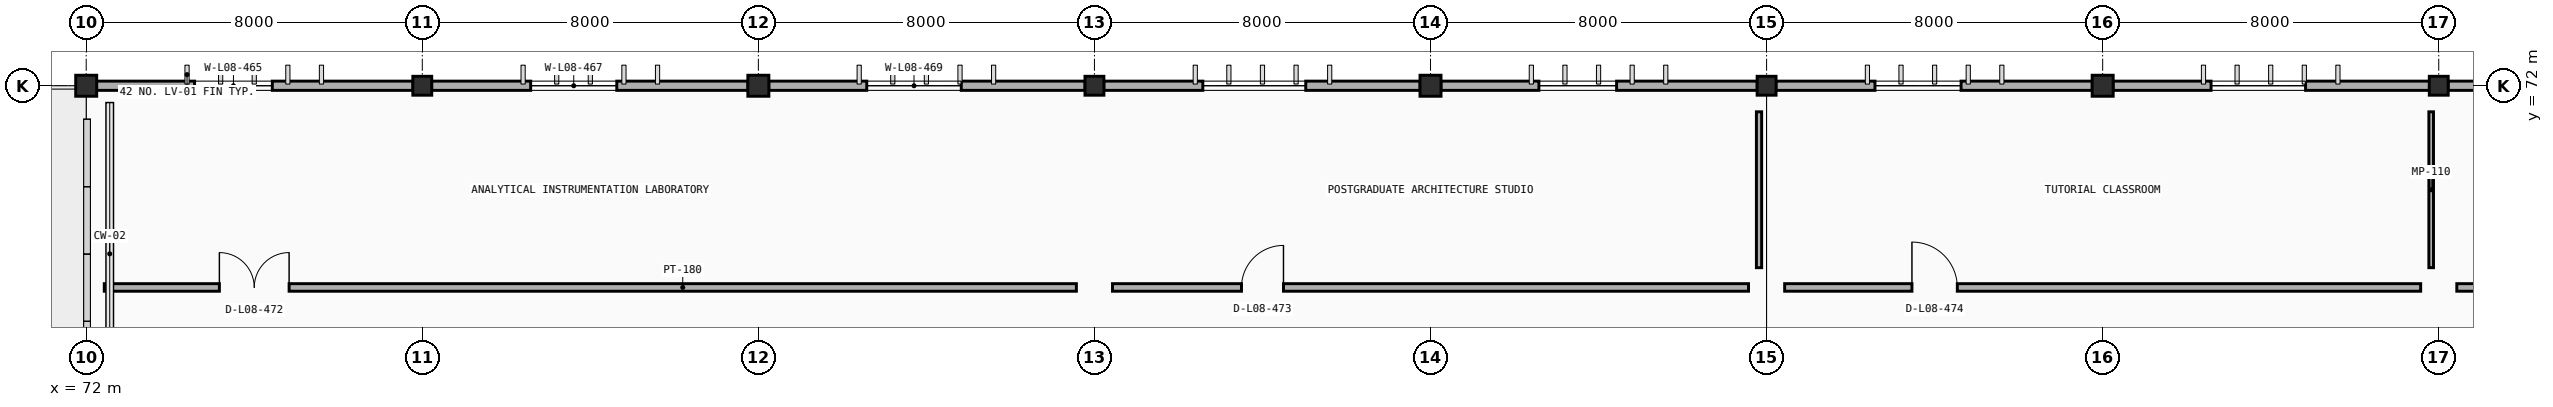
"""IFC4 building model, lengths in metres.
Left out: names, types, materials, properties, quantities, classifications, styles, units other than length and angle.
Written with IfcOpenShell. Run it as: python <this file> out.ifc"""

import sys

from ifc_helpers import new_model, si_unit, direction, frame, frame_2d, origin, origin_2d, place, context, subcontext, project, spatial, rectangle, extrude, element, fill, save


model = new_model("IFC4")
c1 = context("Model", 3, precision=1e-05, world=origin(), true_north=direction((0.0, 1.0)))
c2 = subcontext(c1, "Body", "Model", "MODEL_VIEW")
j1 = project(units=[si_unit("LENGTHUNIT", "METRE"), si_unit("PLANEANGLEUNIT", "RADIAN")], contexts=[c1])
p1 = place(None, origin())
s1 = spatial("IfcSite", under=j1, at=p1, CompositionType="ELEMENT")
p2 = place(p1, origin())
s2 = spatial("IfcBuilding", under=s1, at=p2, CompositionType="ELEMENT")
p3 = place(p2, frame((0.0, 0.0, 30.6)))
s3 = spatial("IfcBuildingStorey", under=s2, at=p3, CompositionType="ELEMENT", Elevation=30.6)
p4 = place(p3, frame((72.0, 72.0, 0.0), z_axis=(0.0, 0.0, 1.0), x_axis=(1.0, 0.0, 0.0)))
e1 = element("IfcColumn", 1, at=p4, inside=s3, PredefinedType="COLUMN", context=c2, shape_type="SweptSolid", body=[
    extrude(rectangle(XDim=0.5, YDim=0.5, at=origin_2d()), origin(), (0.0, 0.0, 1.0), 4.2),
])
p5 = place(p3, frame((80.0, 72.0, 0.0), z_axis=(0.0, 0.0, 1.0), x_axis=(1.0, 0.0, 0.0)))
e2 = element("IfcColumn", 2, at=p5, inside=s3, PredefinedType="COLUMN", context=c2, shape_type="SweptSolid", body=[
    extrude(rectangle(XDim=0.45, YDim=0.45, at=origin_2d()), origin(), (0.0, 0.0, 1.0), 4.2),
])
p6 = place(p3, frame((88.0, 72.0, 0.0), z_axis=(0.0, 0.0, 1.0), x_axis=(1.0, 0.0, 0.0)))
e3 = element("IfcColumn", 3, at=p6, inside=s3, PredefinedType="COLUMN", context=c2, shape_type="SweptSolid", body=[
    extrude(rectangle(XDim=0.5, YDim=0.5, at=origin_2d()), origin(), (0.0, 0.0, 1.0), 4.2),
])
p7 = place(p3, frame((96.0, 72.0, 0.0), z_axis=(0.0, 0.0, 1.0), x_axis=(1.0, 0.0, 0.0)))
e4 = element("IfcColumn", 4, at=p7, inside=s3, PredefinedType="COLUMN", context=c2, shape_type="SweptSolid", body=[
    extrude(rectangle(XDim=0.45, YDim=0.45, at=origin_2d()), origin(), (0.0, 0.0, 1.0), 4.2),
])
p8 = place(p3, frame((104.0, 72.0, 0.0), z_axis=(0.0, 0.0, 1.0), x_axis=(1.0, 0.0, 0.0)))
e5 = element("IfcColumn", 5, at=p8, inside=s3, PredefinedType="COLUMN", context=c2, shape_type="SweptSolid", body=[
    extrude(rectangle(XDim=0.5, YDim=0.5, at=origin_2d()), origin(), (0.0, 0.0, 1.0), 4.2),
])
p9 = place(p3, frame((112.0, 72.0, 0.0), z_axis=(0.0, 0.0, 1.0), x_axis=(1.0, 0.0, 0.0)))
e6 = element("IfcColumn", 6, at=p9, inside=s3, PredefinedType="COLUMN", context=c2, shape_type="SweptSolid", body=[
    extrude(rectangle(XDim=0.45, YDim=0.45, at=origin_2d()), origin(), (0.0, 0.0, 1.0), 4.2),
])
p10 = place(p3, frame((120.0, 72.0, 0.0), z_axis=(0.0, 0.0, 1.0), x_axis=(1.0, 0.0, 0.0)))
e7 = element("IfcColumn", 7, at=p10, inside=s3, PredefinedType="COLUMN", context=c2, shape_type="SweptSolid", body=[
    extrude(rectangle(XDim=0.5, YDim=0.5, at=origin_2d()), origin(), (0.0, 0.0, 1.0), 4.2),
])
p11 = place(p3, frame((128.0, 72.0, 0.0), z_axis=(0.0, 0.0, 1.0), x_axis=(1.0, 0.0, 0.0)))
e8 = element("IfcColumn", 8, at=p11, inside=s3, PredefinedType="COLUMN", context=c2, shape_type="SweptSolid", body=[
    extrude(rectangle(XDim=0.45, YDim=0.45, at=origin_2d()), origin(), (0.0, 0.0, 1.0), 4.2),
])
p12 = place(p3, frame((72.247, 72.0, 0.0), z_axis=(0.0, 0.0, 1.0), x_axis=(1.0, 0.0, 0.0)))
e9 = element("IfcWall", 9, at=p12, inside=s3, PredefinedType="STANDARD", context=c2, shape_type="SweptSolid", body=[
    extrude(rectangle(XDim=7.531, YDim=0.22, at=frame_2d((3.766, 0.0))), origin(), (0.0, 0.0, 1.0), 3.335),
])
p13 = place(p12, frame((2.333, 0.0, 0.9)))
e10 = element("IfcOpeningElement", 10, at=p13, cuts=e9, PredefinedType="OPENING", context=c2, shape_type="SweptSolid", body=[
    extrude(rectangle(XDim=1.85, YDim=1.25, at=frame_2d((0.925, 0.625))), frame((0.0, 0.12, 0.0), z_axis=(0.0, -1.0, 0.0), x_axis=(1.0, 0.0, 0.0)), (0.0, 0.0, 1.0), 0.24),
])
p14 = place(p3, frame((80.222, 72.0, 0.0), z_axis=(0.0, 0.0, 1.0), x_axis=(1.0, 0.0, 0.0)))
e11 = element("IfcWall", 11, at=p14, inside=s3, PredefinedType="STANDARD", context=c2, shape_type="SweptSolid", body=[
    extrude(rectangle(XDim=7.531, YDim=0.22, at=frame_2d((3.766, 0.0))), origin(), (0.0, 0.0, 1.0), 3.335),
])
p15 = place(p14, frame((2.358, 0.0, 0.9)))
e12 = element("IfcOpeningElement", 12, at=p15, cuts=e11, PredefinedType="OPENING", context=c2, shape_type="SweptSolid", body=[
    extrude(rectangle(XDim=2.05, YDim=1.25, at=frame_2d((1.025, 0.625))), frame((0.0, 0.12, 0.0), z_axis=(0.0, -1.0, 0.0), x_axis=(1.0, 0.0, 0.0)), (0.0, 0.0, 1.0), 0.24),
])
p16 = place(p3, frame((88.247, 72.0, 0.0), z_axis=(0.0, 0.0, 1.0), x_axis=(1.0, 0.0, 0.0)))
e13 = element("IfcWall", 13, at=p16, inside=s3, PredefinedType="STANDARD", context=c2, shape_type="SweptSolid", body=[
    extrude(rectangle(XDim=7.531, YDim=0.22, at=frame_2d((3.766, 0.0))), origin(), (0.0, 0.0, 1.0), 3.335),
])
p17 = place(p16, frame((2.333, 0.0, 0.9)))
e14 = element("IfcOpeningElement", 14, at=p17, cuts=e13, PredefinedType="OPENING", context=c2, shape_type="SweptSolid", body=[
    extrude(rectangle(XDim=2.25, YDim=1.25, at=frame_2d((1.125, 0.625))), frame((0.0, 0.12, 0.0), z_axis=(0.0, -1.0, 0.0), x_axis=(1.0, 0.0, 0.0)), (0.0, 0.0, 1.0), 0.24),
])
p18 = place(p3, frame((96.222, 72.0, 0.0), z_axis=(0.0, 0.0, 1.0), x_axis=(1.0, 0.0, 0.0)))
e15 = element("IfcWall", 15, at=p18, inside=s3, PredefinedType="STANDARD", context=c2, shape_type="SweptSolid", body=[
    extrude(rectangle(XDim=7.531, YDim=0.22, at=frame_2d((3.766, 0.0))), origin(), (0.0, 0.0, 1.0), 3.335),
])
p19 = place(p18, frame((2.358, 0.0, 0.9)))
e16 = element("IfcOpeningElement", 16, at=p19, cuts=e15, PredefinedType="OPENING", context=c2, shape_type="SweptSolid", body=[
    extrude(rectangle(XDim=2.45, YDim=1.25, at=frame_2d((1.225, 0.625))), frame((0.0, 0.12, 0.0), z_axis=(0.0, -1.0, 0.0), x_axis=(1.0, 0.0, 0.0)), (0.0, 0.0, 1.0), 0.24),
])
p20 = place(p3, frame((104.247, 72.0, 0.0), z_axis=(0.0, 0.0, 1.0), x_axis=(1.0, 0.0, 0.0)))
e17 = element("IfcWall", 17, at=p20, inside=s3, PredefinedType="STANDARD", context=c2, shape_type="SweptSolid", body=[
    extrude(rectangle(XDim=7.531, YDim=0.22, at=frame_2d((3.766, 0.0))), origin(), (0.0, 0.0, 1.0), 3.335),
])
p21 = place(p20, frame((2.333, 0.0, 0.9)))
e18 = element("IfcOpeningElement", 18, at=p21, cuts=e17, PredefinedType="OPENING", context=c2, shape_type="SweptSolid", body=[
    extrude(rectangle(XDim=1.85, YDim=1.25, at=frame_2d((0.925, 0.625))), frame((0.0, 0.12, 0.0), z_axis=(0.0, -1.0, 0.0), x_axis=(1.0, 0.0, 0.0)), (0.0, 0.0, 1.0), 0.24),
])
p22 = place(p3, frame((112.222, 72.0, 0.0), z_axis=(0.0, 0.0, 1.0), x_axis=(1.0, 0.0, 0.0)))
e19 = element("IfcWall", 19, at=p22, inside=s3, PredefinedType="STANDARD", context=c2, shape_type="SweptSolid", body=[
    extrude(rectangle(XDim=7.531, YDim=0.22, at=frame_2d((3.766, 0.0))), origin(), (0.0, 0.0, 1.0), 3.335),
])
p23 = place(p22, frame((2.358, 0.0, 0.9)))
e20 = element("IfcOpeningElement", 20, at=p23, cuts=e19, PredefinedType="OPENING", context=c2, shape_type="SweptSolid", body=[
    extrude(rectangle(XDim=2.05, YDim=1.25, at=frame_2d((1.025, 0.625))), frame((0.0, 0.12, 0.0), z_axis=(0.0, -1.0, 0.0), x_axis=(1.0, 0.0, 0.0)), (0.0, 0.0, 1.0), 0.24),
])
p24 = place(p3, frame((120.247, 72.0, 0.0), z_axis=(0.0, 0.0, 1.0), x_axis=(1.0, 0.0, 0.0)))
e21 = element("IfcWall", 21, at=p24, inside=s3, PredefinedType="STANDARD", context=c2, shape_type="SweptSolid", body=[
    extrude(rectangle(XDim=7.531, YDim=0.22, at=frame_2d((3.766, 0.0))), origin(), (0.0, 0.0, 1.0), 3.335),
])
p25 = place(p24, frame((2.333, 0.0, 0.9)))
e22 = element("IfcOpeningElement", 22, at=p25, cuts=e21, PredefinedType="OPENING", context=c2, shape_type="SweptSolid", body=[
    extrude(rectangle(XDim=2.25, YDim=1.25, at=frame_2d((1.125, 0.625))), frame((0.0, 0.12, 0.0), z_axis=(0.0, -1.0, 0.0), x_axis=(1.0, 0.0, 0.0)), (0.0, 0.0, 1.0), 0.24),
])
p26 = place(p3, frame((128.222, 72.0, 0.0), z_axis=(0.0, 0.0, 1.0), x_axis=(1.0, 0.0, 0.0)))
e23 = element("IfcWall", 23, at=p26, inside=s3, PredefinedType="STANDARD", context=c2, shape_type="SweptSolid", body=[
    extrude(rectangle(XDim=7.531, YDim=0.22, at=frame_2d((3.766, 0.0))), origin(), (0.0, 0.0, 1.0), 3.335),
])
p27 = place(p26, frame((2.358, 0.0, 0.9)))
e24 = element("IfcOpeningElement", 24, at=p27, cuts=e23, PredefinedType="OPENING", context=c2, shape_type="SweptSolid", body=[
    extrude(rectangle(XDim=2.45, YDim=1.25, at=frame_2d((1.225, 0.625))), frame((0.0, 0.12, 0.0), z_axis=(0.0, -1.0, 0.0), x_axis=(1.0, 0.0, 0.0)), (0.0, 0.0, 1.0), 0.24),
])
p28 = place(p3, frame((72.24, 71.78, 0.0), z_axis=(0.0, 0.0, 1.0), x_axis=(1.0, 0.0, 0.0)))
e25 = element("IfcWall", 25, at=p28, inside=s3, PredefinedType="PARAPET", context=c2, shape_type="SweptSolid", body=[
    extrude(rectangle(XDim=0.32, YDim=0.2, at=frame_2d((0.16, 0.0))), origin(), (0.0, 0.0, 1.0), 3.35),
])
p29 = place(p3, frame((72.43, 67.2, 0.0), z_axis=(0.0, 0.0, 1.0), x_axis=(1.0, 0.0, 0.0)))
e26 = element("IfcWall", 26, at=p29, inside=s3, PredefinedType="PARTITIONING", context=c2, shape_type="SweptSolid", body=[
    extrude(rectangle(XDim=23.14, YDim=0.18, at=frame_2d((11.57, 0.0))), origin(), (0.0, 0.0, 1.0), 3.3),
])
p30 = place(p29, frame((2.74, 0.0, 0.0)))
e27 = element("IfcOpeningElement", 27, at=p30, cuts=e26, PredefinedType="OPENING", context=c2, shape_type="SweptSolid", body=[
    extrude(rectangle(XDim=1.66, YDim=2.22, at=frame_2d((0.83, 1.11))), frame((0.0, 0.1, 0.0), z_axis=(0.0, -1.0, 0.0), x_axis=(1.0, 0.0, 0.0)), (0.0, 0.0, 1.0), 0.2),
])
p31 = place(p3, frame((96.43, 67.2, 0.0), z_axis=(0.0, 0.0, 1.0), x_axis=(1.0, 0.0, 0.0)))
e28 = element("IfcWall", 28, at=p31, inside=s3, PredefinedType="PARTITIONING", context=c2, shape_type="SweptSolid", body=[
    extrude(rectangle(XDim=15.14, YDim=0.18, at=frame_2d((7.57, 0.0))), origin(), (0.0, 0.0, 1.0), 3.3),
])
p32 = place(p31, frame((3.07, 0.0, 0.0)))
e29 = element("IfcOpeningElement", 29, at=p32, cuts=e28, PredefinedType="OPENING", context=c2, shape_type="SweptSolid", body=[
    extrude(rectangle(XDim=1.0, YDim=2.15, at=frame_2d((0.5, 1.075))), frame((0.0, 0.1, 0.0), z_axis=(0.0, -1.0, 0.0), x_axis=(1.0, 0.0, 0.0)), (0.0, 0.0, 1.0), 0.2),
])
p33 = place(p3, frame((111.82, 67.67, 0.0), z_axis=(0.0, 0.0, 1.0), x_axis=(0.0, 1.0, 0.0)))
e30 = element("IfcWall", 30, at=p33, inside=s3, PredefinedType="PARTITIONING", context=c2, shape_type="SweptSolid", body=[
    extrude(rectangle(XDim=3.71, YDim=0.125, at=frame_2d((1.855, 0.0))), origin(), (0.0, 0.0, 1.0), 3.3),
])
p34 = place(p3, frame((112.43, 67.2, 0.0), z_axis=(0.0, 0.0, 1.0), x_axis=(1.0, 0.0, 0.0)))
e31 = element("IfcWall", 31, at=p34, inside=s3, PredefinedType="PARTITIONING", context=c2, shape_type="SweptSolid", body=[
    extrude(rectangle(XDim=15.14, YDim=0.18, at=frame_2d((7.57, 0.0))), origin(), (0.0, 0.0, 1.0), 3.3),
])
p35 = place(p34, frame((3.03, 0.0, 0.0)))
e32 = element("IfcOpeningElement", 32, at=p35, cuts=e31, PredefinedType="OPENING", context=c2, shape_type="SweptSolid", body=[
    extrude(rectangle(XDim=1.08, YDim=2.15, at=frame_2d((0.54, 1.075))), frame((0.0, 0.1, 0.0), z_axis=(0.0, -1.0, 0.0), x_axis=(1.0, 0.0, 0.0)), (0.0, 0.0, 1.0), 0.2),
])
p36 = place(p3, frame((127.82, 67.67, 0.0), z_axis=(0.0, 0.0, 1.0), x_axis=(0.0, 1.0, 0.0)))
e33 = element("IfcWall", 33, at=p36, inside=s3, PredefinedType="MOVABLE", context=c2, shape_type="SweptSolid", body=[
    extrude(rectangle(XDim=3.71, YDim=0.11, at=frame_2d((1.855, 0.0))), origin(), (0.0, 0.0, 1.0), 3.3),
])
p37 = place(p3, frame((128.43, 67.2, 0.0), z_axis=(0.0, 0.0, 1.0), x_axis=(1.0, 0.0, 0.0)))
e34 = element("IfcWall", 34, at=p37, inside=s3, PredefinedType="PARTITIONING", context=c2, shape_type="SweptSolid", body=[
    extrude(rectangle(XDim=15.14, YDim=0.18, at=frame_2d((7.57, 0.0))), origin(), (0.0, 0.0, 1.0), 3.3),
])
p38 = place(p37, frame((2.995, 0.0, 0.0)))
e35 = element("IfcOpeningElement", 35, at=p38, cuts=e34, PredefinedType="OPENING", context=c2, shape_type="SweptSolid", body=[
    extrude(rectangle(XDim=1.15, YDim=2.15, at=frame_2d((0.575, 1.075))), frame((0.0, 0.1, 0.0), z_axis=(0.0, -1.0, 0.0), x_axis=(1.0, 0.0, 0.0)), (0.0, 0.0, 1.0), 0.2),
])
p39 = place(p13, origin())
e36 = element("IfcWindow", 36, at=p39, inside=s3, PartitioningType="DOUBLE_PANEL_VERTICAL", PredefinedType="WINDOW", context=c2, shape_type="SweptSolid", body=[
    extrude(rectangle(XDim=1.85, YDim=1.25, at=frame_2d((0.925, 0.625))), frame((0.0, 0.03, 0.0), z_axis=(0.0, -1.0, 0.0), x_axis=(1.0, 0.0, 0.0)), (0.0, 0.0, 1.0), 0.06),
])
fill(e10, e36)
p40 = place(p15, origin())
e37 = element("IfcWindow", 37, at=p40, inside=s3, PartitioningType="DOUBLE_PANEL_VERTICAL", PredefinedType="WINDOW", context=c2, shape_type="SweptSolid", body=[
    extrude(rectangle(XDim=2.05, YDim=1.25, at=frame_2d((1.025, 0.625))), frame((0.0, 0.03, 0.0), z_axis=(0.0, -1.0, 0.0), x_axis=(1.0, 0.0, 0.0)), (0.0, 0.0, 1.0), 0.06),
])
fill(e12, e37)
p41 = place(p17, origin())
e38 = element("IfcWindow", 38, at=p41, inside=s3, PartitioningType="DOUBLE_PANEL_VERTICAL", PredefinedType="WINDOW", context=c2, shape_type="SweptSolid", body=[
    extrude(rectangle(XDim=2.25, YDim=1.25, at=frame_2d((1.125, 0.625))), frame((0.0, 0.03, 0.0), z_axis=(0.0, -1.0, 0.0), x_axis=(1.0, 0.0, 0.0)), (0.0, 0.0, 1.0), 0.06),
])
fill(e14, e38)
p42 = place(p19, origin())
e39 = element("IfcWindow", 39, at=p42, inside=s3, PartitioningType="DOUBLE_PANEL_VERTICAL", PredefinedType="WINDOW", context=c2, shape_type="SweptSolid", body=[
    extrude(rectangle(XDim=2.45, YDim=1.25, at=frame_2d((1.225, 0.625))), frame((0.0, 0.03, 0.0), z_axis=(0.0, -1.0, 0.0), x_axis=(1.0, 0.0, 0.0)), (0.0, 0.0, 1.0), 0.06),
])
fill(e16, e39)
p43 = place(p21, origin())
e40 = element("IfcWindow", 40, at=p43, inside=s3, PartitioningType="DOUBLE_PANEL_VERTICAL", PredefinedType="WINDOW", context=c2, shape_type="SweptSolid", body=[
    extrude(rectangle(XDim=1.85, YDim=1.25, at=frame_2d((0.925, 0.625))), frame((0.0, 0.03, 0.0), z_axis=(0.0, -1.0, 0.0), x_axis=(1.0, 0.0, 0.0)), (0.0, 0.0, 1.0), 0.06),
])
fill(e18, e40)
p44 = place(p23, origin())
e41 = element("IfcWindow", 41, at=p44, inside=s3, PartitioningType="DOUBLE_PANEL_VERTICAL", PredefinedType="WINDOW", context=c2, shape_type="SweptSolid", body=[
    extrude(rectangle(XDim=2.05, YDim=1.25, at=frame_2d((1.025, 0.625))), frame((0.0, 0.03, 0.0), z_axis=(0.0, -1.0, 0.0), x_axis=(1.0, 0.0, 0.0)), (0.0, 0.0, 1.0), 0.06),
])
fill(e20, e41)
p45 = place(p25, origin())
e42 = element("IfcWindow", 42, at=p45, inside=s3, PartitioningType="DOUBLE_PANEL_VERTICAL", PredefinedType="WINDOW", context=c2, shape_type="SweptSolid", body=[
    extrude(rectangle(XDim=2.25, YDim=1.25, at=frame_2d((1.125, 0.625))), frame((0.0, 0.03, 0.0), z_axis=(0.0, -1.0, 0.0), x_axis=(1.0, 0.0, 0.0)), (0.0, 0.0, 1.0), 0.06),
])
fill(e22, e42)
p46 = place(p30, origin())
e43 = element("IfcDoor", 43, at=p46, inside=s3, OperationType="DOUBLE_DOOR_SINGLE_SWING", PredefinedType="DOOR", context=c2, shape_type="SweptSolid", body=[
    extrude(rectangle(XDim=1.66, YDim=2.22, at=frame_2d((0.83, 1.11))), frame((0.0, 0.025, 0.0), z_axis=(0.0, -1.0, 0.0), x_axis=(1.0, 0.0, 0.0)), (0.0, 0.0, 1.0), 0.05),
])
fill(e27, e43)
p47 = place(p32, origin())
e44 = element("IfcDoor", 44, at=p47, inside=s3, OperationType="SINGLE_SWING_RIGHT", PredefinedType="DOOR", context=c2, shape_type="SweptSolid", body=[
    extrude(rectangle(XDim=1.0, YDim=2.15, at=frame_2d((0.5, 1.075))), frame((0.0, 0.025, 0.0), z_axis=(0.0, -1.0, 0.0), x_axis=(1.0, 0.0, 0.0)), (0.0, 0.0, 1.0), 0.05),
])
fill(e29, e44)
p48 = place(p35, origin())
e45 = element("IfcDoor", 45, at=p48, inside=s3, OperationType="SINGLE_SWING_LEFT", PredefinedType="DOOR", context=c2, shape_type="SweptSolid", body=[
    extrude(rectangle(XDim=1.08, YDim=2.15, at=frame_2d((0.54, 1.075))), frame((0.0, 0.025, 0.0), z_axis=(0.0, -1.0, 0.0), x_axis=(1.0, 0.0, 0.0)), (0.0, 0.0, 1.0), 0.05),
])
fill(e32, e45)
save(model, sys.argv[1])
